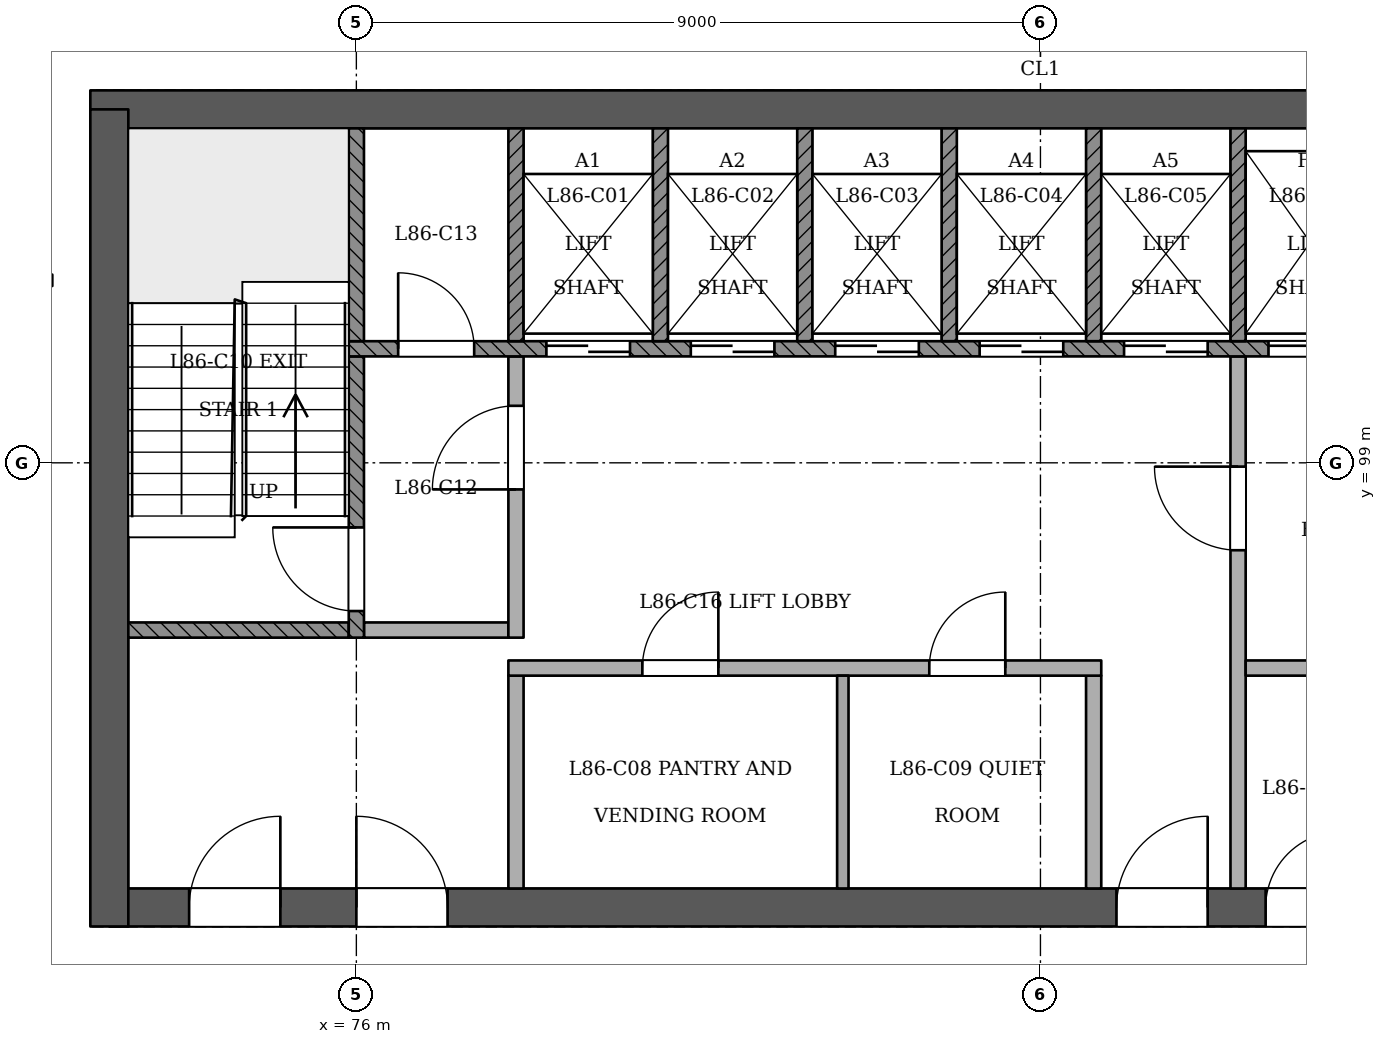
"""IFC4 building model, lengths in metres.
Left out: names, types, materials, properties, quantities, classifications, styles, units other than length and angle.
Written with IfcOpenShell. Run it as: python <this file> out.ifc"""

import sys

from ifc_helpers import new_model, si_unit, direction, frame, frame_2d, origin, place, context, subcontext, project, spatial, rectangle, extrude, element, fill, save


model = new_model("IFC4")
c1 = context("Model", 3, precision=1e-05, world=origin(), true_north=direction((0.0, 1.0)))
c2 = subcontext(c1, "Body", "Model", "MODEL_VIEW")
j1 = project(units=[si_unit("LENGTHUNIT", "METRE"), si_unit("PLANEANGLEUNIT", "RADIAN")], contexts=[c1])
p1 = place(None, origin())
s1 = spatial("IfcSite", under=j1, at=p1, CompositionType="ELEMENT")
p2 = place(p1, origin())
s2 = spatial("IfcBuilding", under=s1, at=p2, CompositionType="ELEMENT")
p3 = place(p2, frame((0.0, 0.0, 331.0)))
s3 = spatial("IfcBuildingStorey", under=s2, at=p3, CompositionType="ELEMENT", Elevation=331.0)
p4 = place(p3, frame((72.75, 93.15, 0.0), z_axis=(0.0, 0.0, 1.0), x_axis=(1.0, 0.0, 0.0)))
e1 = element("IfcWall", 1, at=p4, inside=s3, PredefinedType="SHEAR", context=c2, shape_type="SweptSolid", body=[
    extrude(rectangle(XDim=24.75, YDim=0.5, at=frame_2d((12.375, 0.0))), origin(), (0.0, 0.0, 1.0), 3.6),
])
p5 = place(p4, frame((1.05, 0.0, 0.0)))
e2 = element("IfcOpeningElement", 2, at=p5, cuts=e1, PredefinedType="OPENING", context=c2, shape_type="SweptSolid", body=[
    extrude(rectangle(XDim=1.2, YDim=2.1, at=frame_2d((0.6, 1.05))), frame((0.0, 0.26, 0.0), z_axis=(0.0, -1.0, 0.0), x_axis=(1.0, 0.0, 0.0)), (0.0, 0.0, 1.0), 0.521),
])
p6 = place(p4, frame((3.25, 0.0, 0.0)))
e3 = element("IfcOpeningElement", 3, at=p6, cuts=e1, PredefinedType="OPENING", context=c2, shape_type="SweptSolid", body=[
    extrude(rectangle(XDim=1.2, YDim=2.1, at=frame_2d((0.6, 1.05))), frame((0.0, 0.26, 0.0), z_axis=(0.0, -1.0, 0.0), x_axis=(1.0, 0.0, 0.0)), (0.0, 0.0, 1.0), 0.521),
])
p7 = place(p4, frame((13.25, 0.0, 0.0)))
e4 = element("IfcOpeningElement", 4, at=p7, cuts=e1, PredefinedType="OPENING", context=c2, shape_type="SweptSolid", body=[
    extrude(rectangle(XDim=1.2, YDim=2.1, at=frame_2d((0.6, 1.05))), frame((0.0, 0.26, 0.0), z_axis=(0.0, -1.0, 0.0), x_axis=(1.0, 0.0, 0.0)), (0.0, 0.0, 1.0), 0.521),
])
p8 = place(p4, frame((15.212, 0.0, 0.0)))
e5 = element("IfcOpeningElement", 5, at=p8, cuts=e1, PredefinedType="OPENING", context=c2, shape_type="SweptSolid", body=[
    extrude(rectangle(XDim=1.0, YDim=2.1, at=frame_2d((0.5, 1.05))), frame((0.0, 0.26, 0.0), z_axis=(0.0, -1.0, 0.0), x_axis=(1.0, 0.0, 0.0)), (0.0, 0.0, 1.0), 0.521),
])
p9 = place(p4, frame((18.05, 0.0, 0.0)))
e6 = element("IfcOpeningElement", 6, at=p9, cuts=e1, PredefinedType="OPENING", context=c2, shape_type="SweptSolid", body=[
    extrude(rectangle(XDim=1.0, YDim=2.1, at=frame_2d((0.5, 1.05))), frame((0.0, 0.26, 0.0), z_axis=(0.0, -1.0, 0.0), x_axis=(1.0, 0.0, 0.0)), (0.0, 0.0, 1.0), 0.521),
])
p10 = place(p4, frame((20.95, 0.0, 0.0)))
e7 = element("IfcOpeningElement", 7, at=p10, cuts=e1, PredefinedType="OPENING", context=c2, shape_type="SweptSolid", body=[
    extrude(rectangle(XDim=1.0, YDim=2.1, at=frame_2d((0.5, 1.05))), frame((0.0, 0.26, 0.0), z_axis=(0.0, -1.0, 0.0), x_axis=(1.0, 0.0, 0.0)), (0.0, 0.0, 1.0), 0.521),
])
p11 = place(p4, frame((22.837, 0.0, 0.0)))
e8 = element("IfcOpeningElement", 8, at=p11, cuts=e1, PredefinedType="OPENING", context=c2, shape_type="SweptSolid", body=[
    extrude(rectangle(XDim=1.0, YDim=2.1, at=frame_2d((0.5, 1.05))), frame((0.0, 0.26, 0.0), z_axis=(0.0, -1.0, 0.0), x_axis=(1.0, 0.0, 0.0)), (0.0, 0.0, 1.0), 0.521),
])
p12 = place(p3, frame((97.25, 103.65, 0.0), z_axis=(0.0, 0.0, 1.0), x_axis=(-1.0, 0.0, 0.0)))
e9 = element("IfcWall", 9, at=p12, inside=s3, PredefinedType="SHEAR", context=c2, shape_type="SweptSolid", body=[
    extrude(rectangle(XDim=24.75, YDim=0.5, at=frame_2d((12.375, 0.0))), origin(), (0.0, 0.0, 1.0), 3.6),
])
p13 = place(p3, frame((72.75, 103.65, 0.0), z_axis=(0.0, 0.0, 1.0), x_axis=(0.0, -1.0, 0.0)))
e10 = element("IfcWall", 10, at=p13, inside=s3, PredefinedType="SHEAR", context=c2, shape_type="SweptSolid", body=[
    extrude(rectangle(XDim=10.75, YDim=0.5, at=frame_2d((5.375, 0.0))), origin(), (0.0, 0.0, 1.0), 3.6),
])
p14 = place(p3, frame((78.1, 93.4, 0.0), z_axis=(0.0, 0.0, 1.0), x_axis=(0.0, 1.0, 0.0)))
e11 = element("IfcWall", 11, at=p14, inside=s3, PredefinedType="PARTITIONING", context=c2, shape_type="SweptSolid", body=[
    extrude(rectangle(XDim=2.8, YDim=0.2, at=frame_2d((1.4, 0.0))), origin(), (0.0, 0.0, 1.0), 3.3),
])
p15 = place(p3, frame((82.4, 93.4, 0.0), z_axis=(0.0, 0.0, 1.0), x_axis=(0.0, 1.0, 0.0)))
e12 = element("IfcWall", 12, at=p15, inside=s3, PredefinedType="PARTITIONING", context=c2, shape_type="SweptSolid", body=[
    extrude(rectangle(XDim=2.8, YDim=0.15, at=frame_2d((1.4, 0.0))), origin(), (0.0, 0.0, 1.0), 3.3),
])
p16 = place(p3, frame((85.7, 93.4, 0.0), z_axis=(0.0, 0.0, 1.0), x_axis=(0.0, 1.0, 0.0)))
e13 = element("IfcWall", 13, at=p16, inside=s3, PredefinedType="PARTITIONING", context=c2, shape_type="SweptSolid", body=[
    extrude(rectangle(XDim=2.8, YDim=0.2, at=frame_2d((1.4, 0.0))), origin(), (0.0, 0.0, 1.0), 3.3),
])
p17 = place(p3, frame((87.6, 93.4, 0.0), z_axis=(0.0, 0.0, 1.0), x_axis=(0.0, 1.0, 0.0)))
e14 = element("IfcWall", 14, at=p17, inside=s3, PredefinedType="PARTITIONING", context=c2, shape_type="SweptSolid", body=[
    extrude(rectangle(XDim=7.0, YDim=0.2, at=frame_2d((3.5, 0.0))), origin(), (0.0, 0.0, 1.0), 3.3),
])
p18 = place(p17, frame((4.45, 0.0, 0.0)))
e15 = element("IfcOpeningElement", 15, at=p18, cuts=e14, PredefinedType="OPENING", context=c2, shape_type="SweptSolid", body=[
    extrude(rectangle(XDim=1.1, YDim=2.1, at=frame_2d((0.55, 1.05))), frame((0.0, 0.11, 0.0), z_axis=(0.0, -1.0, 0.0), x_axis=(1.0, 0.0, 0.0)), (0.0, 0.0, 1.0), 0.221),
])
p19 = place(p3, frame((78.0, 96.3, 0.0), z_axis=(0.0, 0.0, 1.0), x_axis=(1.0, 0.0, 0.0)))
e16 = element("IfcWall", 16, at=p19, inside=s3, PredefinedType="PARTITIONING", context=c2, shape_type="SweptSolid", body=[
    extrude(rectangle(XDim=7.8, YDim=0.2, at=frame_2d((3.9, 0.0))), origin(), (0.0, 0.0, 1.0), 3.3),
])
p20 = place(p19, frame((1.762, 0.0, 0.0)))
e17 = element("IfcOpeningElement", 17, at=p20, cuts=e16, PredefinedType="OPENING", context=c2, shape_type="SweptSolid", body=[
    extrude(rectangle(XDim=1.0, YDim=2.1, at=frame_2d((0.5, 1.05))), frame((0.0, 0.11, 0.0), z_axis=(0.0, -1.0, 0.0), x_axis=(1.0, 0.0, 0.0)), (0.0, 0.0, 1.0), 0.221),
])
p21 = place(p19, frame((5.538, 0.0, 0.0)))
e18 = element("IfcOpeningElement", 18, at=p21, cuts=e16, PredefinedType="OPENING", context=c2, shape_type="SweptSolid", body=[
    extrude(rectangle(XDim=1.0, YDim=2.1, at=frame_2d((0.5, 1.05))), frame((0.0, 0.11, 0.0), z_axis=(0.0, -1.0, 0.0), x_axis=(1.0, 0.0, 0.0)), (0.0, 0.0, 1.0), 0.221),
])
p22 = place(p3, frame((87.7, 96.3, 0.0), z_axis=(0.0, 0.0, 1.0), x_axis=(1.0, 0.0, 0.0)))
e19 = element("IfcWall", 19, at=p22, inside=s3, PredefinedType="PARTITIONING", context=c2, shape_type="SweptSolid", body=[
    extrude(rectangle(XDim=3.6, YDim=0.2, at=frame_2d((1.8, 0.0))), origin(), (0.0, 0.0, 1.0), 3.3),
])
p23 = place(p3, frame((73.0, 96.8, 0.0), z_axis=(0.0, 0.0, 1.0), x_axis=(1.0, 0.0, 0.0)))
e20 = element("IfcWall", 20, at=p23, inside=s3, PredefinedType="SOLIDWALL", context=c2, shape_type="SweptSolid", body=[
    extrude(rectangle(XDim=2.9, YDim=0.2, at=frame_2d((1.45, 0.0))), origin(), (0.0, 0.0, 1.0), 3.3),
])
p24 = place(p3, frame((76.0, 96.7, 0.0), z_axis=(0.0, 0.0, 1.0), x_axis=(0.0, 1.0, 0.0)))
e21 = element("IfcWall", 21, at=p24, inside=s3, PredefinedType="SOLIDWALL", context=c2, shape_type="SweptSolid", body=[
    extrude(rectangle(XDim=3.7, YDim=0.2, at=frame_2d((1.85, 0.0))), origin(), (0.0, 0.0, 1.0), 3.3),
])
p25 = place(p24, frame((0.35, 0.0, 0.0)))
e22 = element("IfcOpeningElement", 22, at=p25, cuts=e21, PredefinedType="OPENING", context=c2, shape_type="SweptSolid", body=[
    extrude(rectangle(XDim=1.1, YDim=2.1, at=frame_2d((0.55, 1.05))), frame((0.0, 0.11, 0.0), z_axis=(0.0, -1.0, 0.0), x_axis=(1.0, 0.0, 0.0)), (0.0, 0.0, 1.0), 0.221),
])
p26 = place(p3, frame((76.1, 96.8, 0.0), z_axis=(0.0, 0.0, 1.0), x_axis=(1.0, 0.0, 0.0)))
e23 = element("IfcWall", 23, at=p26, inside=s3, PredefinedType="PARTITIONING", context=c2, shape_type="SweptSolid", body=[
    extrude(rectangle(XDim=1.9, YDim=0.2, at=frame_2d((0.95, 0.0))), origin(), (0.0, 0.0, 1.0), 3.3),
])
p27 = place(p3, frame((78.1, 96.7, 0.0), z_axis=(0.0, 0.0, 1.0), x_axis=(0.0, 1.0, 0.0)))
e24 = element("IfcWall", 24, at=p27, inside=s3, PredefinedType="PARTITIONING", context=c2, shape_type="SweptSolid", body=[
    extrude(rectangle(XDim=3.7, YDim=0.2, at=frame_2d((1.85, 0.0))), origin(), (0.0, 0.0, 1.0), 3.3),
])
p28 = place(p27, frame((1.95, 0.0, 0.0)))
e25 = element("IfcOpeningElement", 25, at=p28, cuts=e24, PredefinedType="OPENING", context=c2, shape_type="SweptSolid", body=[
    extrude(rectangle(XDim=1.1, YDim=2.1, at=frame_2d((0.55, 1.05))), frame((0.0, 0.11, 0.0), z_axis=(0.0, -1.0, 0.0), x_axis=(1.0, 0.0, 0.0)), (0.0, 0.0, 1.0), 0.221),
])
p29 = place(p3, frame((75.9, 100.5, 0.0), z_axis=(0.0, 0.0, 1.0), x_axis=(1.0, 0.0, 0.0)))
e26 = element("IfcWall", 26, at=p29, inside=s3, PredefinedType="SOLIDWALL", context=c2, shape_type="SweptSolid", body=[
    extrude(rectangle(XDim=18.2, YDim=0.2, at=frame_2d((9.1, 0.0))), origin(), (0.0, 0.0, 1.0), 3.3),
])
p30 = place(p29, frame((2.6, 0.0, 0.0)))
e27 = element("IfcOpeningElement", 27, at=p30, cuts=e26, PredefinedType="OPENING", context=c2, shape_type="SweptSolid", body=[
    extrude(rectangle(XDim=1.1, YDim=2.1, at=frame_2d((0.55, 1.05))), frame((0.0, 0.11, 0.0), z_axis=(0.0, -1.0, 0.0), x_axis=(1.0, 0.0, 0.0)), (0.0, 0.0, 1.0), 0.221),
])
p31 = place(p29, frame((4.5, 0.0, 0.0)))
e28 = element("IfcOpeningElement", 28, at=p31, cuts=e26, PredefinedType="OPENING", context=c2, shape_type="SweptSolid", body=[
    extrude(rectangle(XDim=1.1, YDim=2.1, at=frame_2d((0.55, 1.05))), frame((0.0, 0.11, 0.0), z_axis=(0.0, -1.0, 0.0), x_axis=(1.0, 0.0, 0.0)), (0.0, 0.0, 1.0), 0.221),
])
p32 = place(p29, frame((6.4, 0.0, 0.0)))
e29 = element("IfcOpeningElement", 29, at=p32, cuts=e26, PredefinedType="OPENING", context=c2, shape_type="SweptSolid", body=[
    extrude(rectangle(XDim=1.1, YDim=2.1, at=frame_2d((0.55, 1.05))), frame((0.0, 0.11, 0.0), z_axis=(0.0, -1.0, 0.0), x_axis=(1.0, 0.0, 0.0)), (0.0, 0.0, 1.0), 0.221),
])
p33 = place(p29, frame((8.3, 0.0, 0.0)))
e30 = element("IfcOpeningElement", 30, at=p33, cuts=e26, PredefinedType="OPENING", context=c2, shape_type="SweptSolid", body=[
    extrude(rectangle(XDim=1.1, YDim=2.1, at=frame_2d((0.55, 1.05))), frame((0.0, 0.11, 0.0), z_axis=(0.0, -1.0, 0.0), x_axis=(1.0, 0.0, 0.0)), (0.0, 0.0, 1.0), 0.221),
])
p34 = place(p29, frame((10.2, 0.0, 0.0)))
e31 = element("IfcOpeningElement", 31, at=p34, cuts=e26, PredefinedType="OPENING", context=c2, shape_type="SweptSolid", body=[
    extrude(rectangle(XDim=1.1, YDim=2.1, at=frame_2d((0.55, 1.05))), frame((0.0, 0.11, 0.0), z_axis=(0.0, -1.0, 0.0), x_axis=(1.0, 0.0, 0.0)), (0.0, 0.0, 1.0), 0.221),
])
p35 = place(p29, frame((12.1, 0.0, 0.0)))
e32 = element("IfcOpeningElement", 32, at=p35, cuts=e26, PredefinedType="OPENING", context=c2, shape_type="SweptSolid", body=[
    extrude(rectangle(XDim=1.1, YDim=2.1, at=frame_2d((0.55, 1.05))), frame((0.0, 0.11, 0.0), z_axis=(0.0, -1.0, 0.0), x_axis=(1.0, 0.0, 0.0)), (0.0, 0.0, 1.0), 0.221),
])
p36 = place(p29, frame((14.0, 0.0, 0.0)))
e33 = element("IfcOpeningElement", 33, at=p36, cuts=e26, PredefinedType="OPENING", context=c2, shape_type="SweptSolid", body=[
    extrude(rectangle(XDim=1.1, YDim=2.1, at=frame_2d((0.55, 1.05))), frame((0.0, 0.11, 0.0), z_axis=(0.0, -1.0, 0.0), x_axis=(1.0, 0.0, 0.0)), (0.0, 0.0, 1.0), 0.221),
])
p37 = place(p29, frame((0.65, 0.0, 0.0)))
e34 = element("IfcOpeningElement", 34, at=p37, cuts=e26, PredefinedType="OPENING", context=c2, shape_type="SweptSolid", body=[
    extrude(rectangle(XDim=1.0, YDim=2.1, at=frame_2d((0.5, 1.05))), frame((0.0, 0.11, 0.0), z_axis=(0.0, -1.0, 0.0), x_axis=(1.0, 0.0, 0.0)), (0.0, 0.0, 1.0), 0.221),
])
p38 = place(p29, frame((16.3, 0.0, 0.0)))
e35 = element("IfcOpeningElement", 35, at=p38, cuts=e26, PredefinedType="OPENING", context=c2, shape_type="SweptSolid", body=[
    extrude(rectangle(XDim=1.0, YDim=2.1, at=frame_2d((0.5, 1.05))), frame((0.0, 0.11, 0.0), z_axis=(0.0, -1.0, 0.0), x_axis=(1.0, 0.0, 0.0)), (0.0, 0.0, 1.0), 0.221),
])
for number, where, z_axis, x_axis in (
    (36, (76.0, 100.6, 0.0), (0.0, 0.0, 1.0), (0.0, 1.0, 0.0)),
    (37, (78.1, 100.6, 0.0), (0.0, 0.0, 1.0), (0.0, 1.0, 0.0)),
    (38, (80.0, 100.6, 0.0), (0.0, 0.0, 1.0), (0.0, 1.0, 0.0)),
    (39, (81.9, 100.6, 0.0), (0.0, 0.0, 1.0), (0.0, 1.0, 0.0)),
    (40, (83.8, 100.6, 0.0), (0.0, 0.0, 1.0), (0.0, 1.0, 0.0)),
    (41, (85.7, 100.6, 0.0), (0.0, 0.0, 1.0), (0.0, 1.0, 0.0)),
    (42, (87.6, 100.6, 0.0), (0.0, 0.0, 1.0), (0.0, 1.0, 0.0)),
):
    element("IfcWall", number, at=place(p3, frame(where, z_axis=z_axis, x_axis=x_axis)), inside=s3, PredefinedType="SOLIDWALL", context=c2, shape_type="SweptSolid", body=[
        extrude(rectangle(XDim=2.8, YDim=0.2, at=frame_2d((1.4, 0.0))), origin(), (0.0, 0.0, 1.0), 3.3),
    ])
p39 = place(p30, origin())
e43 = element("IfcDoor", 43, at=p39, inside=s3, OperationType="SLIDING_TO_RIGHT", PredefinedType="NOTDEFINED", context=c2, shape_type="SweptSolid", body=[
    extrude(rectangle(XDim=1.1, YDim=2.1, at=frame_2d((0.55, 1.05))), frame((0.0, 0.025, 0.0), z_axis=(0.0, -1.0, 0.0), x_axis=(1.0, 0.0, 0.0)), (0.0, 0.0, 1.0), 0.05),
])
fill(e27, e43)
p40 = place(p31, origin())
e44 = element("IfcDoor", 44, at=p40, inside=s3, OperationType="SLIDING_TO_LEFT", PredefinedType="NOTDEFINED", context=c2, shape_type="SweptSolid", body=[
    extrude(rectangle(XDim=1.1, YDim=2.1, at=frame_2d((0.55, 1.05))), frame((0.0, 0.025, 0.0), z_axis=(0.0, -1.0, 0.0), x_axis=(1.0, 0.0, 0.0)), (0.0, 0.0, 1.0), 0.05),
])
fill(e28, e44)
p41 = place(p32, origin())
e45 = element("IfcDoor", 45, at=p41, inside=s3, OperationType="SLIDING_TO_RIGHT", PredefinedType="NOTDEFINED", context=c2, shape_type="SweptSolid", body=[
    extrude(rectangle(XDim=1.1, YDim=2.1, at=frame_2d((0.55, 1.05))), frame((0.0, 0.025, 0.0), z_axis=(0.0, -1.0, 0.0), x_axis=(1.0, 0.0, 0.0)), (0.0, 0.0, 1.0), 0.05),
])
fill(e29, e45)
p42 = place(p33, origin())
e46 = element("IfcDoor", 46, at=p42, inside=s3, OperationType="SLIDING_TO_LEFT", PredefinedType="NOTDEFINED", context=c2, shape_type="SweptSolid", body=[
    extrude(rectangle(XDim=1.1, YDim=2.1, at=frame_2d((0.55, 1.05))), frame((0.0, 0.025, 0.0), z_axis=(0.0, -1.0, 0.0), x_axis=(1.0, 0.0, 0.0)), (0.0, 0.0, 1.0), 0.05),
])
fill(e30, e46)
p43 = place(p34, origin())
e47 = element("IfcDoor", 47, at=p43, inside=s3, OperationType="SLIDING_TO_RIGHT", PredefinedType="NOTDEFINED", context=c2, shape_type="SweptSolid", body=[
    extrude(rectangle(XDim=1.1, YDim=2.1, at=frame_2d((0.55, 1.05))), frame((0.0, 0.025, 0.0), z_axis=(0.0, -1.0, 0.0), x_axis=(1.0, 0.0, 0.0)), (0.0, 0.0, 1.0), 0.05),
])
fill(e31, e47)
p44 = place(p35, origin())
e48 = element("IfcDoor", 48, at=p44, inside=s3, OperationType="SLIDING_TO_RIGHT", PredefinedType="NOTDEFINED", context=c2, shape_type="SweptSolid", body=[
    extrude(rectangle(XDim=1.1, YDim=2.1, at=frame_2d((0.55, 1.05))), frame((0.0, 0.025, 0.0), z_axis=(0.0, -1.0, 0.0), x_axis=(1.0, 0.0, 0.0)), (0.0, 0.0, 1.0), 0.05),
])
fill(e32, e48)
p45 = place(p25, origin())
e49 = element("IfcDoor", 49, at=p45, inside=s3, OperationType="SINGLE_SWING_RIGHT", PredefinedType="NOTDEFINED", context=c2, shape_type="SweptSolid", body=[
    extrude(rectangle(XDim=1.1, YDim=2.1, at=frame_2d((0.55, 1.05))), frame((0.0, 0.025, 0.0), z_axis=(0.0, -1.0, 0.0), x_axis=(1.0, 0.0, 0.0)), (0.0, 0.0, 1.0), 0.05),
])
fill(e22, e49)
p46 = place(p28, origin())
e50 = element("IfcDoor", 50, at=p46, inside=s3, OperationType="SINGLE_SWING_LEFT", PredefinedType="NOTDEFINED", context=c2, shape_type="SweptSolid", body=[
    extrude(rectangle(XDim=1.1, YDim=2.1, at=frame_2d((0.55, 1.05))), frame((0.0, 0.025, 0.0), z_axis=(0.0, -1.0, 0.0), x_axis=(1.0, 0.0, 0.0)), (0.0, 0.0, 1.0), 0.05),
])
fill(e25, e50)
p47 = place(p18, origin())
e51 = element("IfcDoor", 51, at=p47, inside=s3, OperationType="SINGLE_SWING_RIGHT", PredefinedType="NOTDEFINED", context=c2, shape_type="SweptSolid", body=[
    extrude(rectangle(XDim=1.1, YDim=2.1, at=frame_2d((0.55, 1.05))), frame((0.0, 0.025, 0.0), z_axis=(0.0, -1.0, 0.0), x_axis=(1.0, 0.0, 0.0)), (0.0, 0.0, 1.0), 0.05),
])
fill(e15, e51)
p48 = place(p5, origin())
e52 = element("IfcDoor", 52, at=p48, inside=s3, OperationType="SINGLE_SWING_RIGHT", PredefinedType="NOTDEFINED", context=c2, shape_type="SweptSolid", body=[
    extrude(rectangle(XDim=1.2, YDim=2.1, at=frame_2d((0.6, 1.05))), frame((0.0, 0.025, 0.0), z_axis=(0.0, -1.0, 0.0), x_axis=(1.0, 0.0, 0.0)), (0.0, 0.0, 1.0), 0.05),
])
fill(e2, e52)
p49 = place(p6, origin())
e53 = element("IfcDoor", 53, at=p49, inside=s3, OperationType="SINGLE_SWING_LEFT", PredefinedType="NOTDEFINED", context=c2, shape_type="SweptSolid", body=[
    extrude(rectangle(XDim=1.2, YDim=2.1, at=frame_2d((0.6, 1.05))), frame((0.0, 0.025, 0.0), z_axis=(0.0, -1.0, 0.0), x_axis=(1.0, 0.0, 0.0)), (0.0, 0.0, 1.0), 0.05),
])
fill(e3, e53)
p50 = place(p7, origin())
e54 = element("IfcDoor", 54, at=p50, inside=s3, OperationType="SINGLE_SWING_RIGHT", PredefinedType="NOTDEFINED", context=c2, shape_type="SweptSolid", body=[
    extrude(rectangle(XDim=1.2, YDim=2.1, at=frame_2d((0.6, 1.05))), frame((0.0, 0.025, 0.0), z_axis=(0.0, -1.0, 0.0), x_axis=(1.0, 0.0, 0.0)), (0.0, 0.0, 1.0), 0.05),
])
fill(e4, e54)
p51 = place(p37, origin())
e55 = element("IfcDoor", 55, at=p51, inside=s3, OperationType="SINGLE_SWING_LEFT", PredefinedType="NOTDEFINED", context=c2, shape_type="SweptSolid", body=[
    extrude(rectangle(XDim=1.0, YDim=2.1, at=frame_2d((0.5, 1.05))), frame((0.0, 0.025, 0.0), z_axis=(0.0, -1.0, 0.0), x_axis=(1.0, 0.0, 0.0)), (0.0, 0.0, 1.0), 0.05),
])
fill(e34, e55)
p52 = place(p8, origin())
e56 = element("IfcDoor", 56, at=p52, inside=s3, OperationType="SINGLE_SWING_RIGHT", PredefinedType="NOTDEFINED", context=c2, shape_type="SweptSolid", body=[
    extrude(rectangle(XDim=1.0, YDim=2.1, at=frame_2d((0.5, 1.05))), frame((0.0, 0.025, 0.0), z_axis=(0.0, -1.0, 0.0), x_axis=(1.0, 0.0, 0.0)), (0.0, 0.0, 1.0), 0.05),
])
fill(e5, e56)
p53 = place(p20, origin())
e57 = element("IfcDoor", 57, at=p53, inside=s3, OperationType="SINGLE_SWING_RIGHT", PredefinedType="NOTDEFINED", context=c2, shape_type="SweptSolid", body=[
    extrude(rectangle(XDim=1.0, YDim=2.1, at=frame_2d((0.5, 1.05))), frame((0.0, 0.025, 0.0), z_axis=(0.0, -1.0, 0.0), x_axis=(1.0, 0.0, 0.0)), (0.0, 0.0, 1.0), 0.05),
])
fill(e17, e57)
p54 = place(p21, origin())
e58 = element("IfcDoor", 58, at=p54, inside=s3, OperationType="SINGLE_SWING_RIGHT", PredefinedType="NOTDEFINED", context=c2, shape_type="SweptSolid", body=[
    extrude(rectangle(XDim=1.0, YDim=2.1, at=frame_2d((0.5, 1.05))), frame((0.0, 0.025, 0.0), z_axis=(0.0, -1.0, 0.0), x_axis=(1.0, 0.0, 0.0)), (0.0, 0.0, 1.0), 0.05),
])
fill(e18, e58)
save(model, sys.argv[1])
